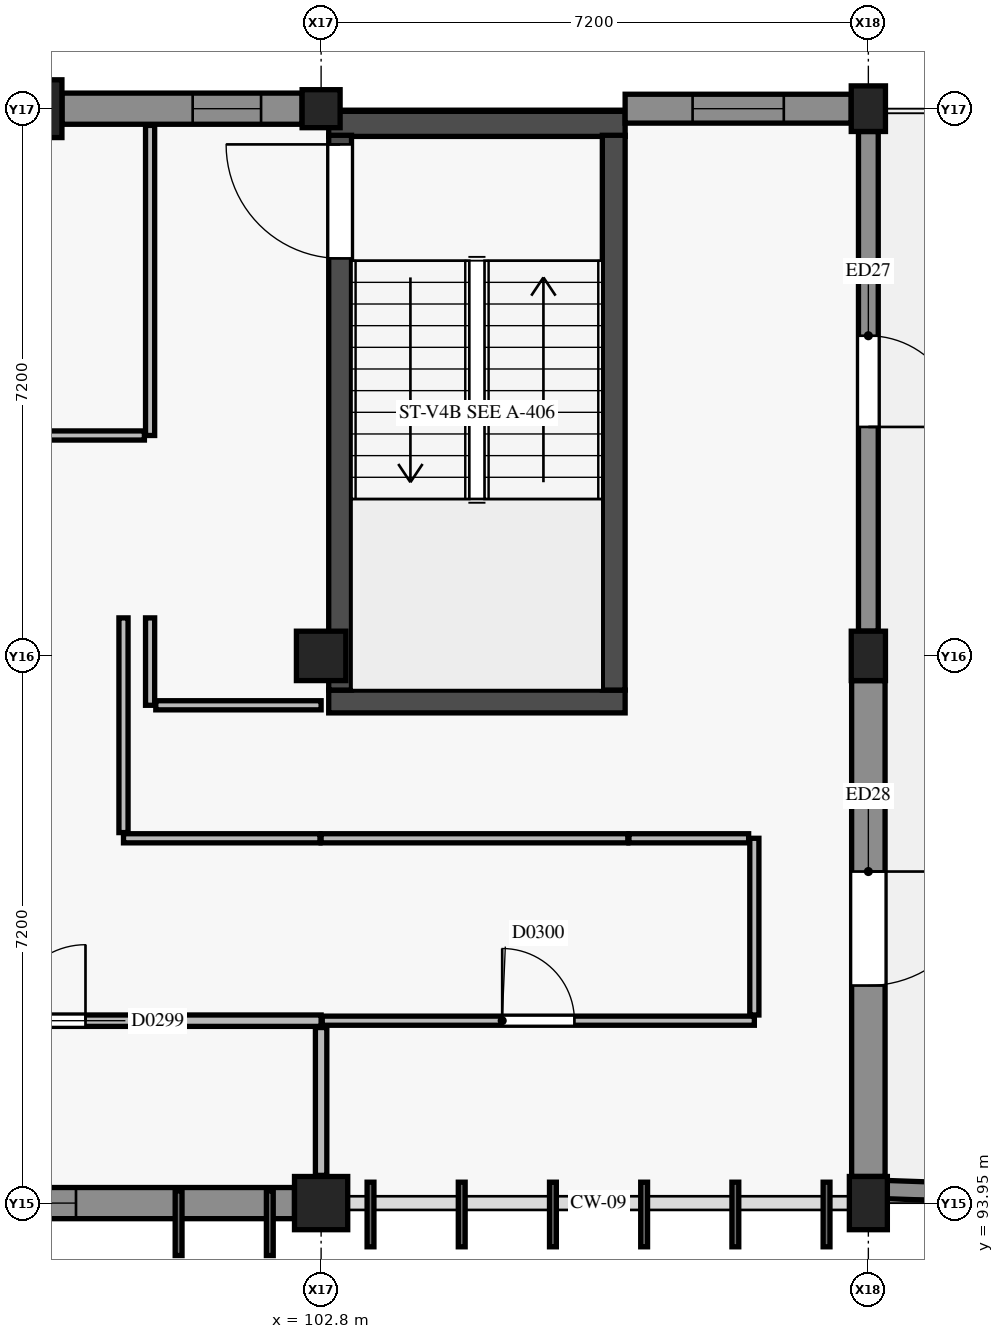
"""IFC4 building model, lengths in metres.
Left out: names, types, materials, properties, quantities, classifications, styles, units other than length and angle.
Written with IfcOpenShell. Run it as: python <this file> out.ifc"""

import sys

from ifc_helpers import new_model, si_unit, direction, frame, frame_2d, origin, origin_2d, place, context, subcontext, project, spatial, rectangle, circle, extrude, element, fill, save


model = new_model("IFC4")
c1 = context("Model", 3, precision=1e-05, world=origin(), true_north=direction((0.0, 1.0)))
c2 = subcontext(c1, "Body", "Model", "MODEL_VIEW")
j1 = project(units=[si_unit("LENGTHUNIT", "METRE"), si_unit("PLANEANGLEUNIT", "RADIAN")], contexts=[c1])
p1 = place(None, origin())
s1 = spatial("IfcSite", under=j1, at=p1, CompositionType="ELEMENT")
p2 = place(p1, origin())
s2 = spatial("IfcBuilding", under=s1, at=p2, CompositionType="ELEMENT")
p3 = place(p2, frame((0.0, 0.0, 17.4)))
s3 = spatial("IfcBuildingStorey", under=s2, at=p3, CompositionType="ELEMENT", Elevation=17.4)
p4 = place(p3, frame((102.8, 93.95, 0.0), z_axis=(0.0, 0.0, 1.0), x_axis=(1.0, 0.0, 0.0)))
e1 = element("IfcColumn", 1, at=p4, inside=s3, PredefinedType="COLUMN", context=c2, shape_type="SweptSolid", body=[
    extrude(rectangle(XDim=0.7, YDim=0.7, at=origin_2d()), origin(), (0.0, 0.0, 1.0), 4.2),
])
p5 = place(p3, frame((102.8, 101.15, 0.0), z_axis=(0.0, 0.0, 1.0), x_axis=(1.0, 0.0, 0.0)))
e2 = element("IfcColumn", 2, at=p5, inside=s3, PredefinedType="COLUMN", context=c2, shape_type="SweptSolid", body=[
    extrude(rectangle(XDim=0.65, YDim=0.65, at=origin_2d()), origin(), (0.0, 0.0, 1.0), 4.2),
])
p6 = place(p3, frame((102.8, 108.35, 0.0), z_axis=(0.0, 0.0, 1.0), x_axis=(1.0, 0.0, 0.0)))
e3 = element("IfcColumn", 3, at=p6, inside=s3, PredefinedType="COLUMN", context=c2, shape_type="SweptSolid", body=[
    extrude(circle(Radius=0.25, at=origin_2d()), origin(), (0.0, 0.0, 1.0), 4.2),
])
p7 = place(p3, frame((110.0, 93.95, 0.0), z_axis=(0.0, 0.0, 1.0), x_axis=(1.0, 0.0, 0.0)))
e4 = element("IfcColumn", 4, at=p7, inside=s3, PredefinedType="COLUMN", context=c2, shape_type="SweptSolid", body=[
    extrude(rectangle(XDim=0.5, YDim=0.7, at=origin_2d()), origin(), (0.0, 0.0, 1.0), 4.2),
])
p8 = place(p3, frame((110.0, 101.15, 0.0), z_axis=(0.0, 0.0, 1.0), x_axis=(1.0, 0.0, 0.0)))
e5 = element("IfcColumn", 5, at=p8, inside=s3, PredefinedType="COLUMN", context=c2, shape_type="SweptSolid", body=[
    extrude(rectangle(XDim=0.45, YDim=0.65, at=origin_2d()), origin(), (0.0, 0.0, 1.0), 4.2),
])
p9 = place(p3, frame((110.0, 108.35, 0.0), z_axis=(0.0, 0.0, 1.0), x_axis=(1.0, 0.0, 0.0)))
e6 = element("IfcColumn", 6, at=p9, inside=s3, PredefinedType="COLUMN", context=c2, shape_type="SweptSolid", body=[
    extrude(rectangle(XDim=0.45, YDim=0.6, at=origin_2d()), origin(), (0.0, 0.0, 1.0), 4.2),
])
p10 = place(p3, frame((99.2, 108.35, 0.0), z_axis=(0.0, 0.0, 1.0), x_axis=(1.0, 0.0, 0.0)))
e7 = element("IfcColumn", 7, at=p10, inside=s3, PredefinedType="PILASTER", context=c2, shape_type="SweptSolid", body=[
    extrude(rectangle(XDim=0.38, YDim=0.76, at=origin_2d()), origin(), (0.0, 0.0, 1.0), 4.2),
])
p11 = place(p3, frame((102.9, 100.55, 0.0), z_axis=(0.0, 0.0, 1.0), x_axis=(1.0, 0.0, 0.0)))
e8 = element("IfcWall", 8, at=p11, inside=s3, PredefinedType="SHEAR", context=c2, shape_type="SweptSolid", body=[
    extrude(rectangle(XDim=3.9, YDim=0.3, at=frame_2d((1.95, 0.0))), origin(), (0.0, 0.0, 1.0), 3.92),
])
p12 = place(p3, frame((102.9, 108.15, 0.0), z_axis=(0.0, 0.0, 1.0), x_axis=(1.0, 0.0, 0.0)))
e9 = element("IfcWall", 9, at=p12, inside=s3, PredefinedType="SHEAR", context=c2, shape_type="SweptSolid", body=[
    extrude(rectangle(XDim=3.9, YDim=0.33, at=frame_2d((1.95, 0.0))), origin(), (0.0, 0.0, 1.0), 3.92),
])
p13 = place(p3, frame((103.05, 100.7, 0.0), z_axis=(0.0, 0.0, 1.0), x_axis=(0.0, 1.0, 0.0)))
e10 = element("IfcWall", 10, at=p13, inside=s3, PredefinedType="SHEAR", context=c2, shape_type="SweptSolid", body=[
    extrude(rectangle(XDim=7.3, YDim=0.3, at=frame_2d((3.65, 0.0))), origin(), (0.0, 0.0, 1.0), 3.92),
])
p14 = place(p13, frame((5.68, 0.0, 0.0)))
e11 = element("IfcOpeningElement", 11, at=p14, cuts=e10, PredefinedType="OPENING", context=c2, shape_type="SweptSolid", body=[
    extrude(rectangle(XDim=1.5, YDim=2.15, at=frame_2d((0.75, 1.075))), frame((0.0, 0.16, 0.0), z_axis=(0.0, -1.0, 0.0), x_axis=(1.0, 0.0, 0.0)), (0.0, 0.0, 1.0), 0.32),
])
p15 = place(p3, frame((106.65, 100.7, 0.0), z_axis=(0.0, 0.0, 1.0), x_axis=(0.0, 1.0, 0.0)))
e12 = element("IfcWall", 12, at=p15, inside=s3, PredefinedType="SHEAR", context=c2, shape_type="SweptSolid", body=[
    extrude(rectangle(XDim=7.3, YDim=0.3, at=frame_2d((3.65, 0.0))), origin(), (0.0, 0.0, 1.0), 3.92),
])
p16 = place(p3, frame((99.39, 108.35, 0.0), z_axis=(0.0, 0.0, 1.0), x_axis=(1.0, 0.0, 0.0)))
e13 = element("IfcWall", 13, at=p16, inside=s3, PredefinedType="USERDEFINED", context=c2, shape_type="SweptSolid", body=[
    extrude(rectangle(XDim=3.16, YDim=0.41, at=frame_2d((1.58, 0.0))), origin(), (0.0, 0.0, 1.0), 3.1),
])
p17 = place(p16, frame((1.72, 0.0, 0.95)))
e14 = element("IfcOpeningElement", 14, at=p17, cuts=e13, PredefinedType="OPENING", context=c2, shape_type="SweptSolid", body=[
    extrude(rectangle(XDim=0.9, YDim=1.2, at=frame_2d((0.45, 0.6))), frame((0.0, 0.215, 0.0), z_axis=(0.0, -1.0, 0.0), x_axis=(1.0, 0.0, 0.0)), (0.0, 0.0, 1.0), 0.43),
])
p18 = place(p3, frame((106.8, 108.35, 0.0), z_axis=(0.0, 0.0, 1.0), x_axis=(1.0, 0.0, 0.0)))
e15 = element("IfcWall", 15, at=p18, inside=s3, PredefinedType="USERDEFINED", context=c2, shape_type="SweptSolid", body=[
    extrude(rectangle(XDim=2.975, YDim=0.38, at=frame_2d((1.487, 0.0))), origin(), (0.0, 0.0, 1.0), 3.1),
])
p19 = place(p18, frame((0.887, 0.0, 0.6)))
e16 = element("IfcOpeningElement", 16, at=p19, cuts=e15, PredefinedType="OPENING", context=c2, shape_type="SweptSolid", body=[
    extrude(rectangle(XDim=1.2, YDim=2.2, at=frame_2d((0.6, 1.1))), frame((0.0, 0.2, 0.0), z_axis=(0.0, -1.0, 0.0), x_axis=(1.0, 0.0, 0.0)), (0.0, 0.0, 1.0), 0.4),
])
p20 = place(p3, frame((110.0, 108.05, 0.0), z_axis=(0.0, 0.0, 1.0), x_axis=(0.0, -1.0, 0.0)))
e17 = element("IfcWall", 17, at=p20, inside=s3, PredefinedType="SOLIDWALL", context=c2, shape_type="SweptSolid", body=[
    extrude(rectangle(XDim=6.575, YDim=0.26, at=frame_2d((3.288, 0.0))), origin(), (0.0, 0.0, 1.0), 3.1),
])
p21 = place(p20, frame((2.688, 0.0, 0.0)))
e18 = element("IfcOpeningElement", 18, at=p21, cuts=e17, PredefinedType="OPENING", context=c2, shape_type="SweptSolid", body=[
    extrude(rectangle(XDim=1.2, YDim=2.2, at=frame_2d((0.6, 1.1))), frame((0.0, 0.14, 0.0), z_axis=(0.0, -1.0, 0.0), x_axis=(1.0, 0.0, 0.0)), (0.0, 0.0, 1.0), 0.28),
])
p22 = place(p3, frame((110.0, 100.825, 0.0), z_axis=(0.0, 0.0, 1.0), x_axis=(0.0, -1.0, 0.0)))
e19 = element("IfcWall", 19, at=p22, inside=s3, PredefinedType="USERDEFINED", context=c2, shape_type="SweptSolid", body=[
    extrude(rectangle(XDim=6.525, YDim=0.44, at=frame_2d((3.262, 0.0))), origin(), (0.0, 0.0, 1.0), 3.1),
])
p23 = place(p22, frame((2.512, 0.0, 0.0)))
e20 = element("IfcOpeningElement", 20, at=p23, cuts=e19, PredefinedType="OPENING", context=c2, shape_type="SweptSolid", body=[
    extrude(rectangle(XDim=1.5, YDim=2.2, at=frame_2d((0.75, 1.1))), frame((0.0, 0.23, 0.0), z_axis=(0.0, -1.0, 0.0), x_axis=(1.0, 0.0, 0.0)), (0.0, 0.0, 1.0), 0.46),
])
p24 = place(p3, frame((102.45, 93.95, 0.0), z_axis=(0.0, 0.0, 1.0), x_axis=(-1.0, 0.0, 0.0)))
e21 = element("IfcWall", 21, at=p24, inside=s3, PredefinedType="USERDEFINED", context=c2, shape_type="SweptSolid", body=[
    extrude(rectangle(XDim=6.65, YDim=0.41, at=frame_2d((3.325, 0.0))), origin(), (0.0, 0.0, 1.0), 3.1),
])
p25 = place(p24, frame((2.875, 0.0, 0.9)))
e22 = element("IfcOpeningElement", 22, at=p25, cuts=e21, PredefinedType="OPENING", context=c2, shape_type="SweptSolid", body=[
    extrude(rectangle(XDim=0.9, YDim=1.2, at=frame_2d((0.45, 0.6))), frame((0.0, 0.215, 0.0), z_axis=(0.0, -1.0, 0.0), x_axis=(1.0, 0.0, 0.0)), (0.0, 0.0, 1.0), 0.43),
])
p26 = place(p3, frame((110.18, 94.13, 0.0), z_axis=(0.0, 0.0, 1.0), x_axis=(0.999385059583, -0.035064265038, 0.0)))
e23 = element("IfcWall", 23, at=p26, inside=s3, PredefinedType="PARAPET", context=c2, shape_type="SweptSolid", body=[
    extrude(rectangle(XDim=6.844, YDim=0.24, at=frame_2d((3.422, 0.0))), origin(), (0.0, 0.0, 1.0), 1.12),
])
p27 = place(p3, frame((95.6, 96.35, 0.0), z_axis=(0.0, 0.0, 1.0), x_axis=(1.0, 0.0, 0.0)))
e24 = element("IfcWall", 24, at=p27, inside=s3, PredefinedType="PARTITIONING", context=c2, shape_type="SweptSolid", body=[
    extrude(rectangle(XDim=7.2, YDim=0.15, at=frame_2d((3.6, 0.0))), origin(), (0.0, 0.0, 1.0), 3.325),
])
p28 = place(p27, frame((3.1, 0.0, 0.0)))
e25 = element("IfcOpeningElement", 25, at=p28, cuts=e24, PredefinedType="OPENING", context=c2, shape_type="SweptSolid", body=[
    extrude(rectangle(XDim=1.0, YDim=2.15, at=frame_2d((0.5, 1.075))), frame((0.0, 0.085, 0.0), z_axis=(0.0, -1.0, 0.0), x_axis=(1.0, 0.0, 0.0)), (0.0, 0.0, 1.0), 0.17),
])
p29 = place(p3, frame((100.55, 100.5, 0.0), z_axis=(0.0, 0.0, 1.0), x_axis=(0.0, 1.0, 0.0)))
e26 = element("IfcWall", 26, at=p29, inside=s3, PredefinedType="PARTITIONING", context=c2, shape_type="SweptSolid", body=[
    extrude(rectangle(XDim=1.15, YDim=0.12, at=frame_2d((0.575, 0.0))), origin(), (0.0, 0.0, 1.0), 3.325),
])
p30 = place(p3, frame((100.625, 100.5, 0.0), z_axis=(0.0, 0.0, 1.0), x_axis=(1.0, 0.0, 0.0)))
e27 = element("IfcWall", 27, at=p30, inside=s3, PredefinedType="PARTITIONING", context=c2, shape_type="SweptSolid", body=[
    extrude(rectangle(XDim=2.175, YDim=0.12, at=frame_2d((1.087, 0.0))), origin(), (0.0, 0.0, 1.0), 3.325),
])
p31 = place(p3, frame((102.815, 96.35, 0.0), z_axis=(0.0, 0.0, 1.0), x_axis=(1.0, 0.0, 0.0)))
e28 = element("IfcWall", 28, at=p31, inside=s3, PredefinedType="PARTITIONING", context=c2, shape_type="SweptSolid", body=[
    extrude(rectangle(XDim=5.685, YDim=0.12, at=frame_2d((2.843, 0.0))), origin(), (0.0, 0.0, 1.0), 3.325),
])
p32 = place(p31, frame((2.367, 0.0, 0.0)))
e29 = element("IfcOpeningElement", 29, at=p32, cuts=e28, PredefinedType="OPENING", context=c2, shape_type="SweptSolid", body=[
    extrude(rectangle(XDim=0.95, YDim=2.1, at=frame_2d((0.475, 1.05))), frame((0.0, 0.07, 0.0), z_axis=(0.0, -1.0, 0.0), x_axis=(1.0, 0.0, 0.0)), (0.0, 0.0, 1.0), 0.14),
])
p33 = place(p3, frame((108.5, 96.425, 0.0), z_axis=(0.0, 0.0, 1.0), x_axis=(0.0, 1.0, 0.0)))
e30 = element("IfcWall", 30, at=p33, inside=s3, PredefinedType="PARTITIONING", context=c2, shape_type="SweptSolid", body=[
    extrude(rectangle(XDim=2.325, YDim=0.12, at=frame_2d((1.163, 0.0))), origin(), (0.0, 0.0, 1.0), 3.445),
])
p34 = place(p3, frame((106.85, 98.75, 0.0), z_axis=(0.0, 0.0, 1.0), x_axis=(1.0, 0.0, 0.0)))
e31 = element("IfcWall", 31, at=p34, inside=s3, PredefinedType="PARTITIONING", context=c2, shape_type="SweptSolid", body=[
    extrude(rectangle(XDim=1.575, YDim=0.12, at=frame_2d((0.788, 0.0))), origin(), (0.0, 0.0, 1.0), 3.445),
])
p35 = place(p3, frame((102.8, 98.75, 0.0), z_axis=(0.0, 0.0, 1.0), x_axis=(1.0, 0.0, 0.0)))
e32 = element("IfcWall", 32, at=p35, inside=s3, PredefinedType="PARTITIONING", context=c2, shape_type="SweptSolid", body=[
    extrude(rectangle(XDim=4.035, YDim=0.12, at=frame_2d((2.018, 0.0))), origin(), (0.0, 0.0, 1.0), 3.325),
])
p36 = place(p3, frame((100.2, 98.75, 0.0), z_axis=(0.0, 0.0, 1.0), x_axis=(1.0, 0.0, 0.0)))
e33 = element("IfcWall", 33, at=p36, inside=s3, PredefinedType="PARTITIONING", context=c2, shape_type="SweptSolid", body=[
    extrude(rectangle(XDim=2.585, YDim=0.12, at=frame_2d((1.292, 0.0))), origin(), (0.0, 0.0, 1.0), 3.325),
])
p37 = place(p3, frame((100.2, 98.825, 0.0), z_axis=(0.0, 0.0, 1.0), x_axis=(0.0, 1.0, 0.0)))
e34 = element("IfcWall", 34, at=p37, inside=s3, PredefinedType="PARTITIONING", context=c2, shape_type="SweptSolid", body=[
    extrude(rectangle(XDim=2.825, YDim=0.12, at=frame_2d((1.413, 0.0))), origin(), (0.0, 0.0, 1.0), 3.325),
])
p38 = place(p3, frame((100.55, 104.05, 0.0), z_axis=(0.0, 0.0, 1.0), x_axis=(0.0, 1.0, 0.0)))
e35 = element("IfcWall", 35, at=p38, inside=s3, PredefinedType="PARTITIONING", context=c2, shape_type="SweptSolid", body=[
    extrude(rectangle(XDim=4.08, YDim=0.12, at=frame_2d((2.04, 0.0))), origin(), (0.0, 0.0, 1.0), 3.445),
])
p39 = place(p3, frame((95.615, 104.05, 0.0), z_axis=(0.0, 0.0, 1.0), x_axis=(1.0, 0.0, 0.0)))
e36 = element("IfcWall", 36, at=p39, inside=s3, PredefinedType="PARTITIONING", context=c2, shape_type="SweptSolid", body=[
    extrude(rectangle(XDim=4.86, YDim=0.12, at=frame_2d((2.43, 0.0))), origin(), (0.0, 0.0, 1.0), 3.325),
])
p40 = place(p39, frame((1.955, 0.0, 0.0)))
e37 = element("IfcOpeningElement", 37, at=p40, cuts=e36, PredefinedType="OPENING", context=c2, shape_type="SweptSolid", body=[
    extrude(rectangle(XDim=0.95, YDim=2.1, at=frame_2d((0.475, 1.05))), frame((0.0, 0.07, 0.0), z_axis=(0.0, -1.0, 0.0), x_axis=(1.0, 0.0, 0.0)), (0.0, 0.0, 1.0), 0.14),
])
p41 = place(p3, frame((102.8, 94.315, 0.0), z_axis=(0.0, 0.0, 1.0), x_axis=(0.0, 1.0, 0.0)))
e38 = element("IfcWall", 38, at=p41, inside=s3, PredefinedType="PARTITIONING", context=c2, shape_type="SweptSolid", body=[
    extrude(rectangle(XDim=1.945, YDim=0.15, at=frame_2d((0.973, 0.0))), origin(), (0.0, 0.0, 1.0), 3.325),
])
p42 = place(p17, origin())
e39 = element("IfcWindow", 39, at=p42, inside=s3, PartitioningType="SINGLE_PANEL", PredefinedType="WINDOW", context=c2, shape_type="SweptSolid", body=[
    extrude(rectangle(XDim=0.9, YDim=1.2, at=frame_2d((0.45, 0.6))), frame((0.0, 0.03, 0.0), z_axis=(0.0, -1.0, 0.0), x_axis=(1.0, 0.0, 0.0)), (0.0, 0.0, 1.0), 0.06),
])
fill(e14, e39)
p43 = place(p19, origin())
e40 = element("IfcWindow", 40, at=p43, inside=s3, PartitioningType="SINGLE_PANEL", PredefinedType="WINDOW", context=c2, shape_type="SweptSolid", body=[
    extrude(rectangle(XDim=1.2, YDim=2.2, at=frame_2d((0.6, 1.1))), frame((0.0, 0.03, 0.0), z_axis=(0.0, -1.0, 0.0), x_axis=(1.0, 0.0, 0.0)), (0.0, 0.0, 1.0), 0.06),
])
fill(e16, e40)
p44 = place(p21, origin())
e41 = element("IfcDoor", 41, at=p44, inside=s3, OperationType="SINGLE_SWING_RIGHT", PredefinedType="DOOR", context=c2, shape_type="SweptSolid", body=[
    extrude(rectangle(XDim=1.2, YDim=2.2, at=frame_2d((0.6, 1.1))), frame((0.0, 0.025, 0.0), z_axis=(0.0, -1.0, 0.0), x_axis=(1.0, 0.0, 0.0)), (0.0, 0.0, 1.0), 0.05),
])
fill(e18, e41)
p45 = place(p23, origin())
e42 = element("IfcDoor", 42, at=p45, inside=s3, OperationType="SINGLE_SWING_LEFT", PredefinedType="DOOR", context=c2, shape_type="SweptSolid", body=[
    extrude(rectangle(XDim=1.5, YDim=2.2, at=frame_2d((0.75, 1.1))), frame((0.0, 0.025, 0.0), z_axis=(0.0, -1.0, 0.0), x_axis=(1.0, 0.0, 0.0)), (0.0, 0.0, 1.0), 0.05),
])
fill(e20, e42)
p46 = place(p25, origin())
e43 = element("IfcWindow", 43, at=p46, inside=s3, PartitioningType="SINGLE_PANEL", PredefinedType="WINDOW", context=c2, shape_type="SweptSolid", body=[
    extrude(rectangle(XDim=0.9, YDim=1.2, at=frame_2d((0.45, 0.6))), frame((0.0, 0.03, 0.0), z_axis=(0.0, -1.0, 0.0), x_axis=(1.0, 0.0, 0.0)), (0.0, 0.0, 1.0), 0.06),
])
fill(e22, e43)
p47 = place(p14, origin())
e44 = element("IfcDoor", 44, at=p47, inside=s3, OperationType="SINGLE_SWING_RIGHT", PredefinedType="DOOR", context=c2, shape_type="SweptSolid", body=[
    extrude(rectangle(XDim=1.5, YDim=2.15, at=frame_2d((0.75, 1.075))), frame((0.0, 0.025, 0.0), z_axis=(0.0, -1.0, 0.0), x_axis=(1.0, 0.0, 0.0)), (0.0, 0.0, 1.0), 0.05),
])
fill(e11, e44)
p48 = place(p28, origin())
e45 = element("IfcDoor", 45, at=p48, inside=s3, OperationType="SINGLE_SWING_RIGHT", PredefinedType="DOOR", context=c2, shape_type="SweptSolid", body=[
    extrude(rectangle(XDim=1.0, YDim=2.15, at=frame_2d((0.5, 1.075))), frame((0.0, 0.025, 0.0), z_axis=(0.0, -1.0, 0.0), x_axis=(1.0, 0.0, 0.0)), (0.0, 0.0, 1.0), 0.05),
])
fill(e25, e45)
p49 = place(p32, origin())
e46 = element("IfcDoor", 46, at=p49, inside=s3, OperationType="SINGLE_SWING_LEFT", PredefinedType="DOOR", context=c2, shape_type="SweptSolid", body=[
    extrude(rectangle(XDim=0.95, YDim=2.1, at=frame_2d((0.475, 1.05))), frame((0.0, 0.025, 0.0), z_axis=(0.0, -1.0, 0.0), x_axis=(1.0, 0.0, 0.0)), (0.0, 0.0, 1.0), 0.05),
])
fill(e29, e46)
save(model, sys.argv[1])
